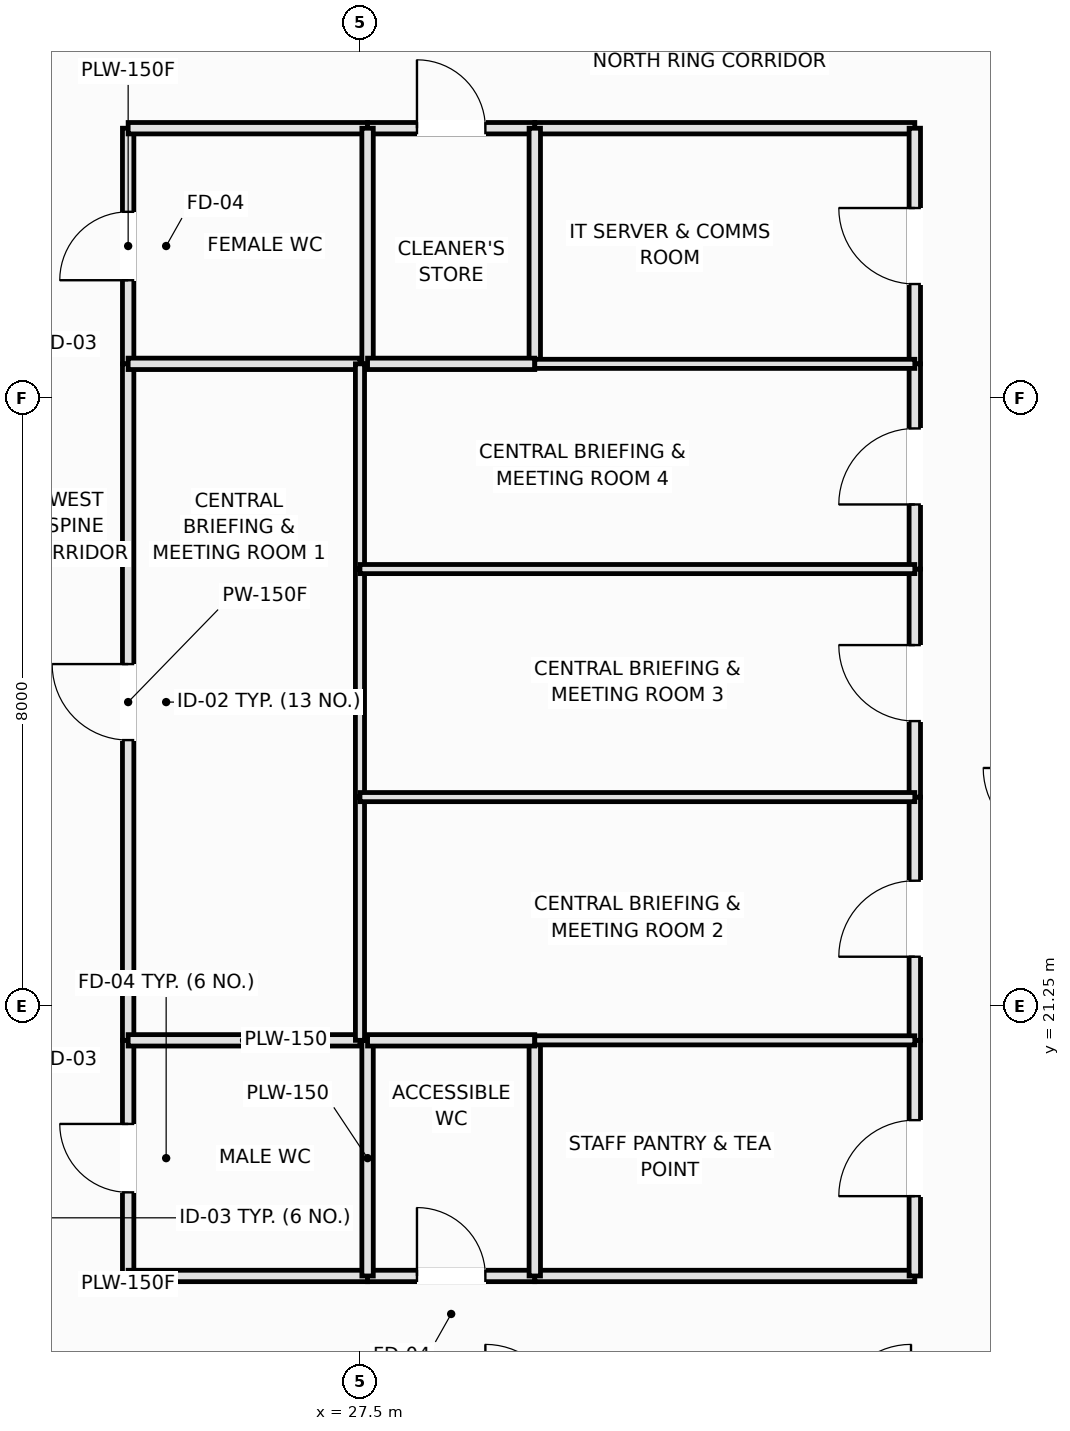
"""IFC4 building model, lengths in metres.
Left out: names, types, materials, properties, quantities, classifications, styles, units other than length and angle.
Written with IfcOpenShell. Run it as: python <this file> out.ifc"""

import sys

from ifc_helpers import new_model, si_unit, direction, frame, frame_2d, origin, place, context, subcontext, project, spatial, rectangle, extrude, element, fill, save


model = new_model("IFC4")
c1 = context("Model", 3, precision=1e-05, world=origin(), true_north=direction((0.0, 1.0)))
c2 = subcontext(c1, "Body", "Model", "MODEL_VIEW")
j1 = project(units=[si_unit("LENGTHUNIT", "METRE"), si_unit("PLANEANGLEUNIT", "RADIAN")], contexts=[c1])
p1 = place(None, origin())
s1 = spatial("IfcSite", under=j1, at=p1, CompositionType="ELEMENT")
p2 = place(p1, origin())
s2 = spatial("IfcBuilding", under=s1, at=p2, CompositionType="ELEMENT")
p3 = place(p2, frame((0.0, 0.0, 68.2)))
s3 = spatial("IfcBuildingStorey", under=s2, at=p3, CompositionType="ELEMENT", Elevation=68.2)
p4 = place(p3, frame((24.45, 17.7, 0.0), z_axis=(0.0, 0.0, 1.0), x_axis=(0.0, 1.0, 0.0)))
e1 = element("IfcWall", 1, at=p4, inside=s3, PredefinedType="PLUMBINGWALL", context=c2, shape_type="SweptSolid", body=[
    extrude(rectangle(XDim=3.1, YDim=0.15, at=frame_2d((1.55, 0.0))), origin(), (0.0, 0.0, 1.0), 3.37),
])
p5 = place(p4, frame((1.1, 0.0, 0.0)))
e2 = element("IfcOpeningElement", 2, at=p5, cuts=e1, PredefinedType="OPENING", context=c2, shape_type="SweptSolid", body=[
    extrude(rectangle(XDim=0.9, YDim=2.1, at=frame_2d((0.45, 1.05))), frame((0.0, 0.085, 0.0), z_axis=(0.0, -1.0, 0.0), x_axis=(1.0, 0.0, 0.0)), (0.0, 0.0, 1.0), 0.17),
])
p6 = place(p3, frame((24.45, 29.7, 0.0), z_axis=(0.0, 0.0, 1.0), x_axis=(0.0, 1.0, 0.0)))
e3 = element("IfcWall", 3, at=p6, inside=s3, PredefinedType="PLUMBINGWALL", context=c2, shape_type="SweptSolid", body=[
    extrude(rectangle(XDim=3.1, YDim=0.15, at=frame_2d((1.55, 0.0))), origin(), (0.0, 0.0, 1.0), 3.37),
])
p7 = place(p6, frame((1.1, 0.0, 0.0)))
e4 = element("IfcOpeningElement", 4, at=p7, cuts=e3, PredefinedType="OPENING", context=c2, shape_type="SweptSolid", body=[
    extrude(rectangle(XDim=0.9, YDim=2.1, at=frame_2d((0.45, 1.05))), frame((0.0, 0.085, 0.0), z_axis=(0.0, -1.0, 0.0), x_axis=(1.0, 0.0, 0.0)), (0.0, 0.0, 1.0), 0.17),
])
p8 = place(p3, frame((24.45, 20.8, 0.0), z_axis=(0.0, 0.0, 1.0), x_axis=(0.0, 1.0, 0.0)))
e5 = element("IfcWall", 5, at=p8, inside=s3, PredefinedType="PARTITIONING", context=c2, shape_type="SweptSolid", body=[
    extrude(rectangle(XDim=8.9, YDim=0.15, at=frame_2d((4.45, 0.0))), origin(), (0.0, 0.0, 1.0), 3.37),
])
p9 = place(p8, frame((3.95, 0.0, 0.0)))
e6 = element("IfcOpeningElement", 6, at=p9, cuts=e5, PredefinedType="OPENING", context=c2, shape_type="SweptSolid", body=[
    extrude(rectangle(XDim=1.0, YDim=2.15, at=frame_2d((0.5, 1.075))), frame((0.0, 0.085, 0.0), z_axis=(0.0, -1.0, 0.0), x_axis=(1.0, 0.0, 0.0)), (0.0, 0.0, 1.0), 0.17),
])
p10 = place(p3, frame((24.45, 17.7, 0.0), z_axis=(0.0, 0.0, 1.0), x_axis=(1.0, 0.0, 0.0)))
e7 = element("IfcWall", 7, at=p10, inside=s3, PredefinedType="PLUMBINGWALL", context=c2, shape_type="SweptSolid", body=[
    extrude(rectangle(XDim=3.15, YDim=0.15, at=frame_2d((1.575, 0.0))), origin(), (0.0, 0.0, 1.0), 3.37),
])
p11 = place(p3, frame((27.6, 17.7, 0.0), z_axis=(0.0, 0.0, 1.0), x_axis=(1.0, 0.0, 0.0)))
e8 = element("IfcWall", 8, at=p11, inside=s3, PredefinedType="PLUMBINGWALL", context=c2, shape_type="SweptSolid", body=[
    extrude(rectangle(XDim=2.2, YDim=0.15, at=frame_2d((1.1, 0.0))), origin(), (0.0, 0.0, 1.0), 3.37),
])
p12 = place(p11, frame((0.65, 0.0, 0.0)))
e9 = element("IfcOpeningElement", 9, at=p12, cuts=e8, PredefinedType="OPENING", context=c2, shape_type="SweptSolid", body=[
    extrude(rectangle(XDim=0.9, YDim=2.1, at=frame_2d((0.45, 1.05))), frame((0.0, 0.085, 0.0), z_axis=(0.0, -1.0, 0.0), x_axis=(1.0, 0.0, 0.0)), (0.0, 0.0, 1.0), 0.17),
])
p13 = place(p3, frame((29.8, 17.7, 0.0), z_axis=(0.0, 0.0, 1.0), x_axis=(1.0, 0.0, 0.0)))
e10 = element("IfcWall", 10, at=p13, inside=s3, PredefinedType="PARTITIONING", context=c2, shape_type="SweptSolid", body=[
    extrude(rectangle(XDim=5.0, YDim=0.15, at=frame_2d((2.5, 0.0))), origin(), (0.0, 0.0, 1.0), 3.37),
])
p14 = place(p3, frame((24.45, 32.8, 0.0), z_axis=(0.0, 0.0, 1.0), x_axis=(1.0, 0.0, 0.0)))
e11 = element("IfcWall", 11, at=p14, inside=s3, PredefinedType="PLUMBINGWALL", context=c2, shape_type="SweptSolid", body=[
    extrude(rectangle(XDim=3.15, YDim=0.15, at=frame_2d((1.575, 0.0))), origin(), (0.0, 0.0, 1.0), 3.37),
])
p15 = place(p3, frame((27.6, 32.8, 0.0), z_axis=(0.0, 0.0, 1.0), x_axis=(1.0, 0.0, 0.0)))
e12 = element("IfcWall", 12, at=p15, inside=s3, PredefinedType="PLUMBINGWALL", context=c2, shape_type="SweptSolid", body=[
    extrude(rectangle(XDim=2.2, YDim=0.15, at=frame_2d((1.1, 0.0))), origin(), (0.0, 0.0, 1.0), 3.37),
])
p16 = place(p15, frame((0.65, 0.0, 0.0)))
e13 = element("IfcOpeningElement", 13, at=p16, cuts=e12, PredefinedType="OPENING", context=c2, shape_type="SweptSolid", body=[
    extrude(rectangle(XDim=0.9, YDim=2.1, at=frame_2d((0.45, 1.05))), frame((0.0, 0.085, 0.0), z_axis=(0.0, -1.0, 0.0), x_axis=(1.0, 0.0, 0.0)), (0.0, 0.0, 1.0), 0.17),
])
p17 = place(p3, frame((29.8, 32.8, 0.0), z_axis=(0.0, 0.0, 1.0), x_axis=(1.0, 0.0, 0.0)))
e14 = element("IfcWall", 14, at=p17, inside=s3, PredefinedType="PARTITIONING", context=c2, shape_type="SweptSolid", body=[
    extrude(rectangle(XDim=5.0, YDim=0.15, at=frame_2d((2.5, 0.0))), origin(), (0.0, 0.0, 1.0), 3.37),
])
p18 = place(p3, frame((34.8, 17.7, 0.0), z_axis=(0.0, 0.0, 1.0), x_axis=(0.0, 1.0, 0.0)))
e15 = element("IfcWall", 15, at=p18, inside=s3, PredefinedType="PARTITIONING", context=c2, shape_type="SweptSolid", body=[
    extrude(rectangle(XDim=3.1, YDim=0.15, at=frame_2d((1.55, 0.0))), origin(), (0.0, 0.0, 1.0), 3.37),
])
p19 = place(p18, frame((1.05, 0.0, 0.0)))
e16 = element("IfcOpeningElement", 16, at=p19, cuts=e15, PredefinedType="OPENING", context=c2, shape_type="SweptSolid", body=[
    extrude(rectangle(XDim=1.0, YDim=2.15, at=frame_2d((0.5, 1.075))), frame((0.0, 0.085, 0.0), z_axis=(0.0, -1.0, 0.0), x_axis=(1.0, 0.0, 0.0)), (0.0, 0.0, 1.0), 0.17),
])
p20 = place(p3, frame((34.8, 29.7, 0.0), z_axis=(0.0, 0.0, 1.0), x_axis=(0.0, 1.0, 0.0)))
e17 = element("IfcWall", 17, at=p20, inside=s3, PredefinedType="PARTITIONING", context=c2, shape_type="SweptSolid", body=[
    extrude(rectangle(XDim=3.1, YDim=0.15, at=frame_2d((1.55, 0.0))), origin(), (0.0, 0.0, 1.0), 3.37),
])
p21 = place(p20, frame((1.05, 0.0, 0.0)))
e18 = element("IfcOpeningElement", 18, at=p21, cuts=e17, PredefinedType="OPENING", context=c2, shape_type="SweptSolid", body=[
    extrude(rectangle(XDim=1.0, YDim=2.15, at=frame_2d((0.5, 1.075))), frame((0.0, 0.085, 0.0), z_axis=(0.0, -1.0, 0.0), x_axis=(1.0, 0.0, 0.0)), (0.0, 0.0, 1.0), 0.17),
])
p22 = place(p3, frame((34.8, 20.8, 0.0), z_axis=(0.0, 0.0, 1.0), x_axis=(0.0, 1.0, 0.0)))
e19 = element("IfcWall", 19, at=p22, inside=s3, PredefinedType="PARTITIONING", context=c2, shape_type="SweptSolid", body=[
    extrude(rectangle(XDim=3.2, YDim=0.15, at=frame_2d((1.6, 0.0))), origin(), (0.0, 0.0, 1.0), 3.37),
])
p23 = place(p22, frame((1.1, 0.0, 0.0)))
e20 = element("IfcOpeningElement", 20, at=p23, cuts=e19, PredefinedType="OPENING", context=c2, shape_type="SweptSolid", body=[
    extrude(rectangle(XDim=1.0, YDim=2.15, at=frame_2d((0.5, 1.075))), frame((0.0, 0.085, 0.0), z_axis=(0.0, -1.0, 0.0), x_axis=(1.0, 0.0, 0.0)), (0.0, 0.0, 1.0), 0.17),
])
p24 = place(p3, frame((34.8, 24.0, 0.0), z_axis=(0.0, 0.0, 1.0), x_axis=(0.0, 1.0, 0.0)))
e21 = element("IfcWall", 21, at=p24, inside=s3, PredefinedType="PARTITIONING", context=c2, shape_type="SweptSolid", body=[
    extrude(rectangle(XDim=3.0, YDim=0.15, at=frame_2d((1.5, 0.0))), origin(), (0.0, 0.0, 1.0), 3.37),
])
p25 = place(p24, frame((1.0, 0.0, 0.0)))
e22 = element("IfcOpeningElement", 22, at=p25, cuts=e21, PredefinedType="OPENING", context=c2, shape_type="SweptSolid", body=[
    extrude(rectangle(XDim=1.0, YDim=2.15, at=frame_2d((0.5, 1.075))), frame((0.0, 0.085, 0.0), z_axis=(0.0, -1.0, 0.0), x_axis=(1.0, 0.0, 0.0)), (0.0, 0.0, 1.0), 0.17),
])
p26 = place(p3, frame((34.8, 27.0, 0.0), z_axis=(0.0, 0.0, 1.0), x_axis=(0.0, 1.0, 0.0)))
e23 = element("IfcWall", 23, at=p26, inside=s3, PredefinedType="PARTITIONING", context=c2, shape_type="SweptSolid", body=[
    extrude(rectangle(XDim=2.7, YDim=0.15, at=frame_2d((1.35, 0.0))), origin(), (0.0, 0.0, 1.0), 3.37),
])
p27 = place(p26, frame((0.85, 0.0, 0.0)))
e24 = element("IfcOpeningElement", 24, at=p27, cuts=e23, PredefinedType="OPENING", context=c2, shape_type="SweptSolid", body=[
    extrude(rectangle(XDim=1.0, YDim=2.15, at=frame_2d((0.5, 1.075))), frame((0.0, 0.085, 0.0), z_axis=(0.0, -1.0, 0.0), x_axis=(1.0, 0.0, 0.0)), (0.0, 0.0, 1.0), 0.17),
])
p28 = place(p3, frame((27.6, 17.7, 0.0), z_axis=(0.0, 0.0, 1.0), x_axis=(0.0, 1.0, 0.0)))
e25 = element("IfcWall", 25, at=p28, inside=s3, PredefinedType="PLUMBINGWALL", context=c2, shape_type="SweptSolid", body=[
    extrude(rectangle(XDim=3.1, YDim=0.15, at=frame_2d((1.55, 0.0))), origin(), (0.0, 0.0, 1.0), 3.37),
])
p29 = place(p3, frame((24.45, 20.8, 0.0), z_axis=(0.0, 0.0, 1.0), x_axis=(1.0, 0.0, 0.0)))
e26 = element("IfcWall", 26, at=p29, inside=s3, PredefinedType="PLUMBINGWALL", context=c2, shape_type="SweptSolid", body=[
    extrude(rectangle(XDim=3.05, YDim=0.15, at=frame_2d((1.525, 0.0))), origin(), (0.0, 0.0, 1.0), 3.37),
])
p30 = place(p3, frame((27.6, 29.7, 0.0), z_axis=(0.0, 0.0, 1.0), x_axis=(0.0, 1.0, 0.0)))
e27 = element("IfcWall", 27, at=p30, inside=s3, PredefinedType="PLUMBINGWALL", context=c2, shape_type="SweptSolid", body=[
    extrude(rectangle(XDim=3.1, YDim=0.15, at=frame_2d((1.55, 0.0))), origin(), (0.0, 0.0, 1.0), 3.37),
])
p31 = place(p3, frame((24.45, 29.7, 0.0), z_axis=(0.0, 0.0, 1.0), x_axis=(1.0, 0.0, 0.0)))
e28 = element("IfcWall", 28, at=p31, inside=s3, PredefinedType="PLUMBINGWALL", context=c2, shape_type="SweptSolid", body=[
    extrude(rectangle(XDim=3.05, YDim=0.15, at=frame_2d((1.525, 0.0))), origin(), (0.0, 0.0, 1.0), 3.37),
])
p32 = place(p3, frame((29.8, 17.7, 0.0), z_axis=(0.0, 0.0, 1.0), x_axis=(0.0, 1.0, 0.0)))
e29 = element("IfcWall", 29, at=p32, inside=s3, PredefinedType="PLUMBINGWALL", context=c2, shape_type="SweptSolid", body=[
    extrude(rectangle(XDim=3.1, YDim=0.15, at=frame_2d((1.55, 0.0))), origin(), (0.0, 0.0, 1.0), 3.37),
])
p33 = place(p3, frame((27.6, 20.8, 0.0), z_axis=(0.0, 0.0, 1.0), x_axis=(1.0, 0.0, 0.0)))
e30 = element("IfcWall", 30, at=p33, inside=s3, PredefinedType="PLUMBINGWALL", context=c2, shape_type="SweptSolid", body=[
    extrude(rectangle(XDim=2.2, YDim=0.15, at=frame_2d((1.1, 0.0))), origin(), (0.0, 0.0, 1.0), 3.37),
])
p34 = place(p3, frame((29.8, 29.7, 0.0), z_axis=(0.0, 0.0, 1.0), x_axis=(0.0, 1.0, 0.0)))
e31 = element("IfcWall", 31, at=p34, inside=s3, PredefinedType="PLUMBINGWALL", context=c2, shape_type="SweptSolid", body=[
    extrude(rectangle(XDim=3.1, YDim=0.15, at=frame_2d((1.55, 0.0))), origin(), (0.0, 0.0, 1.0), 3.37),
])
p35 = place(p3, frame((27.6, 29.7, 0.0), z_axis=(0.0, 0.0, 1.0), x_axis=(1.0, 0.0, 0.0)))
e32 = element("IfcWall", 32, at=p35, inside=s3, PredefinedType="PLUMBINGWALL", context=c2, shape_type="SweptSolid", body=[
    extrude(rectangle(XDim=2.2, YDim=0.15, at=frame_2d((1.1, 0.0))), origin(), (0.0, 0.0, 1.0), 3.37),
])
for number, where, z_axis, x_axis in (
    (33, (29.8, 20.8, 0.0), (0.0, 0.0, 1.0), (1.0, 0.0, 0.0)),
    (34, (29.8, 29.7, 0.0), (0.0, 0.0, 1.0), (1.0, 0.0, 0.0)),
):
    element("IfcWall", number, at=place(p3, frame(where, z_axis=z_axis, x_axis=x_axis)), inside=s3, PredefinedType="PARTITIONING", context=c2, shape_type="SweptSolid", body=[
        extrude(rectangle(XDim=5.0, YDim=0.12, at=frame_2d((2.5, 0.0))), origin(), (0.0, 0.0, 1.0), 3.37),
    ])
p36 = place(p3, frame((27.5, 20.8, 0.0), z_axis=(0.0, 0.0, 1.0), x_axis=(0.0, 1.0, 0.0)))
e35 = element("IfcWall", 35, at=p36, inside=s3, PredefinedType="PARTITIONING", context=c2, shape_type="SweptSolid", body=[
    extrude(rectangle(XDim=3.2, YDim=0.12, at=frame_2d((1.6, 0.0))), origin(), (0.0, 0.0, 1.0), 3.37),
])
p37 = place(p3, frame((27.5, 24.0, 0.0), z_axis=(0.0, 0.0, 1.0), x_axis=(0.0, 1.0, 0.0)))
e36 = element("IfcWall", 36, at=p37, inside=s3, PredefinedType="PARTITIONING", context=c2, shape_type="SweptSolid", body=[
    extrude(rectangle(XDim=3.0, YDim=0.12, at=frame_2d((1.5, 0.0))), origin(), (0.0, 0.0, 1.0), 3.37),
])
p38 = place(p3, frame((27.5, 27.0, 0.0), z_axis=(0.0, 0.0, 1.0), x_axis=(0.0, 1.0, 0.0)))
e37 = element("IfcWall", 37, at=p38, inside=s3, PredefinedType="PARTITIONING", context=c2, shape_type="SweptSolid", body=[
    extrude(rectangle(XDim=2.7, YDim=0.12, at=frame_2d((1.35, 0.0))), origin(), (0.0, 0.0, 1.0), 3.37),
])
for number, where, z_axis, x_axis in (
    (38, (27.5, 24.0, 0.0), (0.0, 0.0, 1.0), (1.0, 0.0, 0.0)),
    (39, (27.5, 27.0, 0.0), (0.0, 0.0, 1.0), (1.0, 0.0, 0.0)),
):
    element("IfcWall", number, at=place(p3, frame(where, z_axis=z_axis, x_axis=x_axis)), inside=s3, PredefinedType="PARTITIONING", context=c2, shape_type="SweptSolid", body=[
        extrude(rectangle(XDim=7.3, YDim=0.12, at=frame_2d((3.65, 0.0))), origin(), (0.0, 0.0, 1.0), 3.37),
    ])
p39 = place(p5, origin())
e40 = element("IfcDoor", 40, at=p39, inside=s3, OperationType="SINGLE_SWING_RIGHT", PredefinedType="DOOR", context=c2, shape_type="SweptSolid", body=[
    extrude(rectangle(XDim=0.9, YDim=2.1, at=frame_2d((0.45, 1.05))), frame((0.0, 0.025, 0.0), z_axis=(0.0, -1.0, 0.0), x_axis=(1.0, 0.0, 0.0)), (0.0, 0.0, 1.0), 0.05),
])
fill(e2, e40)
p40 = place(p7, origin())
e41 = element("IfcDoor", 41, at=p40, inside=s3, OperationType="SINGLE_SWING_LEFT", PredefinedType="DOOR", context=c2, shape_type="SweptSolid", body=[
    extrude(rectangle(XDim=0.9, YDim=2.1, at=frame_2d((0.45, 1.05))), frame((0.0, 0.025, 0.0), z_axis=(0.0, -1.0, 0.0), x_axis=(1.0, 0.0, 0.0)), (0.0, 0.0, 1.0), 0.05),
])
fill(e4, e41)
p41 = place(p9, origin())
e42 = element("IfcDoor", 42, at=p41, inside=s3, OperationType="SINGLE_SWING_RIGHT", PredefinedType="DOOR", context=c2, shape_type="SweptSolid", body=[
    extrude(rectangle(XDim=1.0, YDim=2.15, at=frame_2d((0.5, 1.075))), frame((0.0, 0.025, 0.0), z_axis=(0.0, -1.0, 0.0), x_axis=(1.0, 0.0, 0.0)), (0.0, 0.0, 1.0), 0.05),
])
fill(e6, e42)
p42 = place(p12, origin())
e43 = element("IfcDoor", 43, at=p42, inside=s3, OperationType="SINGLE_SWING_LEFT", PredefinedType="DOOR", context=c2, shape_type="SweptSolid", body=[
    extrude(rectangle(XDim=0.9, YDim=2.1, at=frame_2d((0.45, 1.05))), frame((0.0, 0.025, 0.0), z_axis=(0.0, -1.0, 0.0), x_axis=(1.0, 0.0, 0.0)), (0.0, 0.0, 1.0), 0.05),
])
fill(e9, e43)
p43 = place(p16, origin())
e44 = element("IfcDoor", 44, at=p43, inside=s3, OperationType="SINGLE_SWING_LEFT", PredefinedType="DOOR", context=c2, shape_type="SweptSolid", body=[
    extrude(rectangle(XDim=0.9, YDim=2.1, at=frame_2d((0.45, 1.05))), frame((0.0, 0.025, 0.0), z_axis=(0.0, -1.0, 0.0), x_axis=(1.0, 0.0, 0.0)), (0.0, 0.0, 1.0), 0.05),
])
fill(e13, e44)
p44 = place(p19, origin())
e45 = element("IfcDoor", 45, at=p44, inside=s3, OperationType="SINGLE_SWING_LEFT", PredefinedType="DOOR", context=c2, shape_type="SweptSolid", body=[
    extrude(rectangle(XDim=1.0, YDim=2.15, at=frame_2d((0.5, 1.075))), frame((0.0, 0.025, 0.0), z_axis=(0.0, -1.0, 0.0), x_axis=(1.0, 0.0, 0.0)), (0.0, 0.0, 1.0), 0.05),
])
fill(e16, e45)
p45 = place(p21, origin())
e46 = element("IfcDoor", 46, at=p45, inside=s3, OperationType="SINGLE_SWING_RIGHT", PredefinedType="DOOR", context=c2, shape_type="SweptSolid", body=[
    extrude(rectangle(XDim=1.0, YDim=2.15, at=frame_2d((0.5, 1.075))), frame((0.0, 0.025, 0.0), z_axis=(0.0, -1.0, 0.0), x_axis=(1.0, 0.0, 0.0)), (0.0, 0.0, 1.0), 0.05),
])
fill(e18, e46)
p46 = place(p23, origin())
e47 = element("IfcDoor", 47, at=p46, inside=s3, OperationType="SINGLE_SWING_LEFT", PredefinedType="DOOR", context=c2, shape_type="SweptSolid", body=[
    extrude(rectangle(XDim=1.0, YDim=2.15, at=frame_2d((0.5, 1.075))), frame((0.0, 0.025, 0.0), z_axis=(0.0, -1.0, 0.0), x_axis=(1.0, 0.0, 0.0)), (0.0, 0.0, 1.0), 0.05),
])
fill(e20, e47)
p47 = place(p25, origin())
e48 = element("IfcDoor", 48, at=p47, inside=s3, OperationType="SINGLE_SWING_RIGHT", PredefinedType="DOOR", context=c2, shape_type="SweptSolid", body=[
    extrude(rectangle(XDim=1.0, YDim=2.15, at=frame_2d((0.5, 1.075))), frame((0.0, 0.025, 0.0), z_axis=(0.0, -1.0, 0.0), x_axis=(1.0, 0.0, 0.0)), (0.0, 0.0, 1.0), 0.05),
])
fill(e22, e48)
p48 = place(p27, origin())
e49 = element("IfcDoor", 49, at=p48, inside=s3, OperationType="SINGLE_SWING_LEFT", PredefinedType="DOOR", context=c2, shape_type="SweptSolid", body=[
    extrude(rectangle(XDim=1.0, YDim=2.15, at=frame_2d((0.5, 1.075))), frame((0.0, 0.025, 0.0), z_axis=(0.0, -1.0, 0.0), x_axis=(1.0, 0.0, 0.0)), (0.0, 0.0, 1.0), 0.05),
])
fill(e24, e49)
save(model, sys.argv[1])
